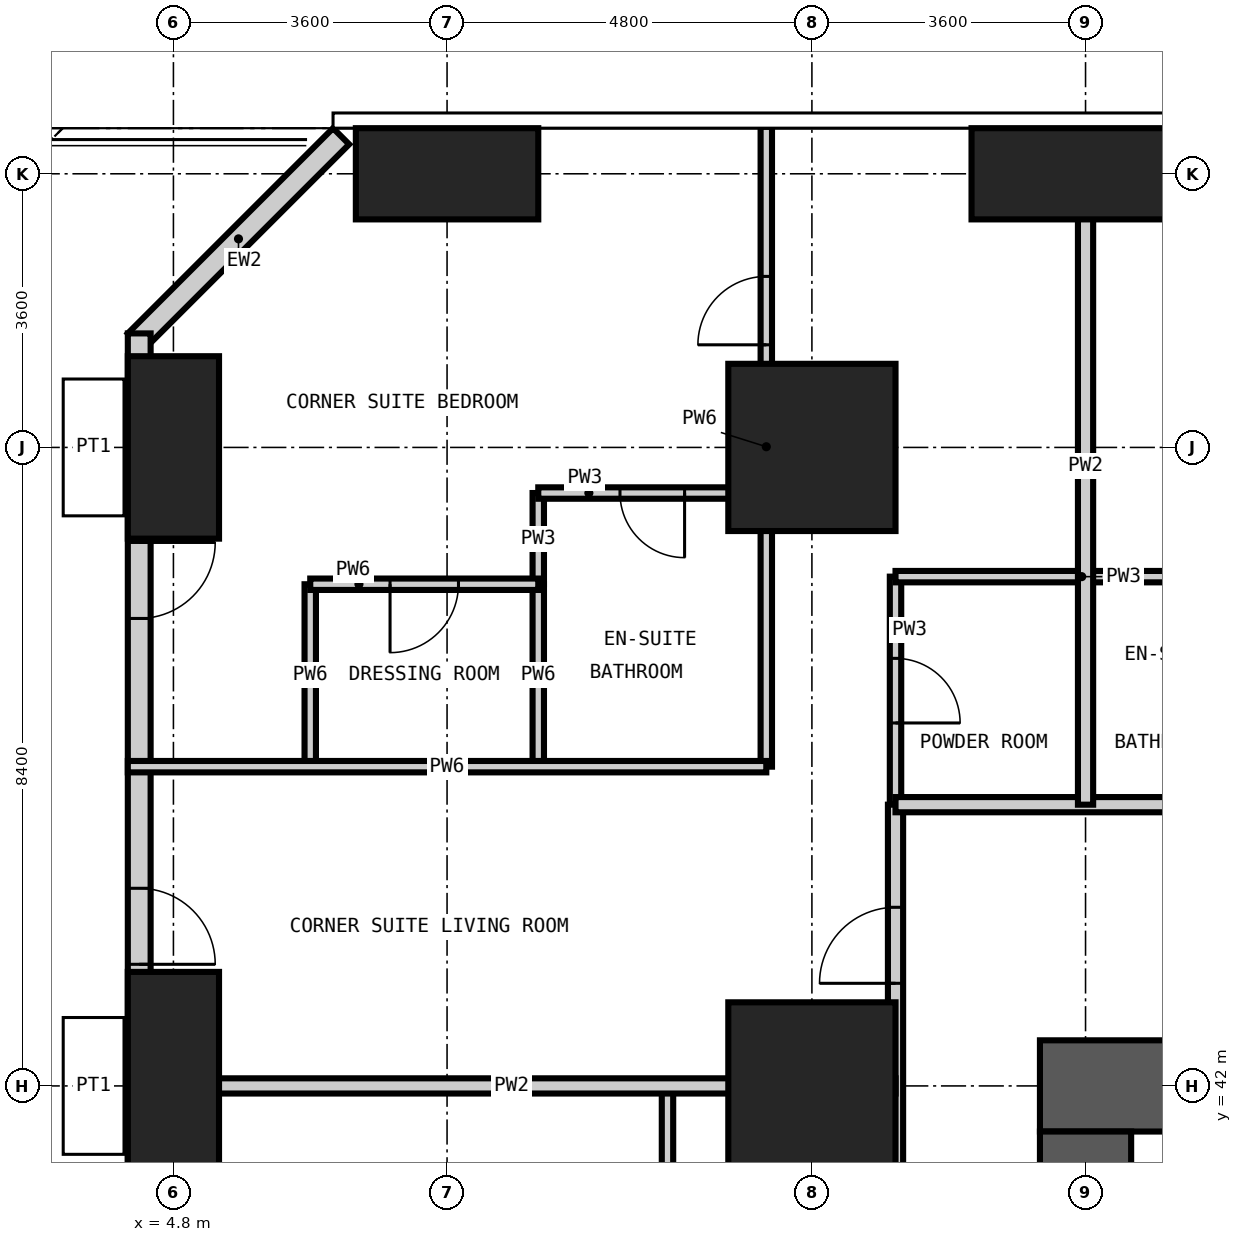
"""IFC4 building model, lengths in metres.
Left out: names, types, materials, properties, quantities, classifications, styles, units other than length and angle.
Written with IfcOpenShell. Run it as: python <this file> out.ifc"""

import sys

from ifc_helpers import new_model, si_unit, direction, frame, frame_2d, origin, origin_2d, place, context, subcontext, project, spatial, rectangle, extrude, element, fill, save


model = new_model("IFC4")
c1 = context("Model", 3, precision=1e-05, world=origin(), true_north=direction((0.0, 1.0)))
c2 = subcontext(c1, "Body", "Model", "MODEL_VIEW")
j1 = project(units=[si_unit("LENGTHUNIT", "METRE"), si_unit("PLANEANGLEUNIT", "RADIAN")], contexts=[c1])
p1 = place(None, origin())
s1 = spatial("IfcSite", under=j1, at=p1, CompositionType="ELEMENT")
p2 = place(p1, origin())
s2 = spatial("IfcBuilding", under=s1, at=p2, CompositionType="ELEMENT")
p3 = place(p2, frame((0.0, 0.0, 159.0)))
s3 = spatial("IfcBuildingStorey", under=s2, at=p3, CompositionType="ELEMENT", Elevation=159.0)
p4 = place(p3, frame((4.8, 42.0, -0.35), z_axis=(0.0, 0.0, 1.0), x_axis=(1.0, 0.0, 0.0)))
e1 = element("IfcColumn", 1, at=p4, inside=s3, PredefinedType="COLUMN", context=c2, shape_type="SweptSolid", body=[
    extrude(rectangle(XDim=1.2, YDim=3.0, at=origin_2d()), origin(), (0.0, 0.0, 1.0), 3.6),
])
p5 = place(p3, frame((4.8, 50.4, -0.35), z_axis=(0.0, 0.0, 1.0), x_axis=(1.0, 0.0, 0.0)))
e2 = element("IfcColumn", 2, at=p5, inside=s3, PredefinedType="COLUMN", context=c2, shape_type="SweptSolid", body=[
    extrude(rectangle(XDim=1.2, YDim=2.4, at=origin_2d()), origin(), (0.0, 0.0, 1.0), 3.6),
])
p6 = place(p3, frame((8.4, 54.0, -0.35), z_axis=(0.0, 0.0, 1.0), x_axis=(1.0, 0.0, 0.0)))
e3 = element("IfcColumn", 3, at=p6, inside=s3, PredefinedType="COLUMN", context=c2, shape_type="SweptSolid", body=[
    extrude(rectangle(XDim=2.4, YDim=1.2, at=origin_2d()), origin(), (0.0, 0.0, 1.0), 3.6),
])
for number, where, z_axis, x_axis in (
    (4, (13.2, 42.0, -0.35), (0.0, 0.0, 1.0), (1.0, 0.0, 0.0)),
    (5, (13.2, 50.4, -0.35), (0.0, 0.0, 1.0), (1.0, 0.0, 0.0)),
):
    element("IfcColumn", number, at=place(p3, frame(where, z_axis=z_axis, x_axis=x_axis)), inside=s3, PredefinedType="COLUMN", context=c2, shape_type="SweptSolid", body=[
        extrude(rectangle(XDim=2.2, YDim=2.2, at=origin_2d()), origin(), (0.0, 0.0, 1.0), 3.6),
    ])
p7 = place(p3, frame((16.8, 54.0, -0.35), z_axis=(0.0, 0.0, 1.0), x_axis=(1.0, 0.0, 0.0)))
e6 = element("IfcColumn", 6, at=p7, inside=s3, PredefinedType="COLUMN", context=c2, shape_type="SweptSolid", body=[
    extrude(rectangle(XDim=3.0, YDim=1.2, at=origin_2d()), origin(), (0.0, 0.0, 1.0), 3.6),
])
p8 = place(p3, frame((42.6, 42.0, -0.35), z_axis=(0.0, 0.0, 1.0), x_axis=(-1.0, 0.0, 0.0)))
e7 = element("IfcWall", 7, at=p8, inside=s3, PredefinedType="SHEAR", context=c2, shape_type="SweptSolid", body=[
    extrude(rectangle(XDim=26.4, YDim=1.2, at=frame_2d((13.2, 0.0))), origin(), (0.0, 0.0, 1.0), 3.6),
])
p9 = place(p8, frame((21.1, 0.0, 0.35)))
e8 = element("IfcOpeningElement", 8, at=p9, cuts=e7, PredefinedType="OPENING", context=c2, shape_type="SweptSolid", body=[
    extrude(rectangle(XDim=1.0, YDim=2.1, at=frame_2d((0.5, 1.05))), frame((0.0, 0.61, 0.0), z_axis=(0.0, -1.0, 0.0), x_axis=(1.0, 0.0, 0.0)), (0.0, 0.0, 1.0), 1.22),
])
p10 = place(p8, frame((10.5, 0.0, 0.35)))
e9 = element("IfcOpeningElement", 9, at=p10, cuts=e7, PredefinedType="OPENING", context=c2, shape_type="SweptSolid", body=[
    extrude(rectangle(XDim=1.2, YDim=2.2, at=frame_2d((0.6, 1.1))), frame((0.0, 0.61, 0.0), z_axis=(0.0, -1.0, 0.0), x_axis=(1.0, 0.0, 0.0)), (0.0, 0.0, 1.0), 1.22),
])
p11 = place(p3, frame((16.8, 41.4, -0.35), z_axis=(0.0, 0.0, 1.0), x_axis=(0.0, -1.0, 0.0)))
e10 = element("IfcWall", 10, at=p11, inside=s3, PredefinedType="SHEAR", context=c2, shape_type="SweptSolid", body=[
    extrude(rectangle(XDim=24.0, YDim=1.2, at=frame_2d((12.0, 0.0))), origin(), (0.0, 0.0, 1.0), 3.6),
])
p12 = place(p11, frame((11.1, 0.0, 0.35)))
e11 = element("IfcOpeningElement", 11, at=p12, cuts=e10, PredefinedType="OPENING", context=c2, shape_type="SweptSolid", body=[
    extrude(rectangle(XDim=1.8, YDim=2.2, at=frame_2d((0.9, 1.1))), frame((0.0, 0.61, 0.0), z_axis=(0.0, -1.0, 0.0), x_axis=(1.0, 0.0, 0.0)), (0.0, 0.0, 1.0), 1.22),
])
p13 = place(p11, frame((19.9, 0.0, 0.35)))
e12 = element("IfcOpeningElement", 12, at=p13, cuts=e10, PredefinedType="OPENING", context=c2, shape_type="SweptSolid", body=[
    extrude(rectangle(XDim=1.0, YDim=2.1, at=frame_2d((0.5, 1.05))), frame((0.0, 0.61, 0.0), z_axis=(0.0, -1.0, 0.0), x_axis=(1.0, 0.0, 0.0)), (0.0, 0.0, 1.0), 1.22),
])
p14 = place(p11, frame((5.2, 0.0, 0.35)))
e13 = element("IfcOpeningElement", 13, at=p14, cuts=e10, PredefinedType="OPENING", context=c2, shape_type="SweptSolid", body=[
    extrude(rectangle(XDim=1.0, YDim=2.1, at=frame_2d((0.5, 1.05))), frame((0.0, 0.61, 0.0), z_axis=(0.0, -1.0, 0.0), x_axis=(1.0, 0.0, 0.0)), (0.0, 0.0, 1.0), 1.22),
])
p15 = place(p3, frame((7.006, 54.494, 0.0), z_axis=(0.0, 0.0, 1.0), x_axis=(-0.707138748762, -0.707074812166, 0.0)))
e14 = element("IfcWall", 14, at=p15, inside=s3, PredefinedType="SOLIDWALL", context=c2, shape_type="SweptSolid", body=[
    extrude(rectangle(XDim=3.818, YDim=0.3, at=frame_2d((1.909, 0.0))), origin(), (0.0, 0.0, 1.0), 3.25),
])
p16 = place(p3, frame((4.35, 51.9, 0.0), z_axis=(0.0, 0.0, 1.0), x_axis=(0.0, -1.0, 0.0)))
e15 = element("IfcWall", 15, at=p16, inside=s3, PredefinedType="SOLIDWALL", context=c2, shape_type="SweptSolid", body=[
    extrude(rectangle(XDim=45.0, YDim=0.3, at=frame_2d((22.5, 0.0))), origin(), (0.0, 0.0, 1.0), 3.25),
])
p17 = place(p16, frame((41.25, 0.0, 0.0)))
e16 = element("IfcOpeningElement", 16, at=p17, cuts=e15, PredefinedType="OPENING", context=c2, shape_type="SweptSolid", body=[
    extrude(rectangle(XDim=1.0, YDim=2.4, at=frame_2d((0.5, 1.2))), frame((0.0, 0.16, 0.0), z_axis=(0.0, -1.0, 0.0), x_axis=(1.0, 0.0, 0.0)), (0.0, 0.0, 1.0), 0.32),
])
p18 = place(p16, frame((36.7, 0.0, 0.0)))
e17 = element("IfcOpeningElement", 17, at=p18, cuts=e15, PredefinedType="OPENING", context=c2, shape_type="SweptSolid", body=[
    extrude(rectangle(XDim=1.0, YDim=2.4, at=frame_2d((0.5, 1.2))), frame((0.0, 0.16, 0.0), z_axis=(0.0, -1.0, 0.0), x_axis=(1.0, 0.0, 0.0)), (0.0, 0.0, 1.0), 0.32),
])
p19 = place(p16, frame((32.5, 0.0, 0.0)))
e18 = element("IfcOpeningElement", 18, at=p19, cuts=e15, PredefinedType="OPENING", context=c2, shape_type="SweptSolid", body=[
    extrude(rectangle(XDim=1.0, YDim=2.4, at=frame_2d((0.5, 1.2))), frame((0.0, 0.16, 0.0), z_axis=(0.0, -1.0, 0.0), x_axis=(1.0, 0.0, 0.0)), (0.0, 0.0, 1.0), 0.32),
])
p20 = place(p16, frame((28.3, 0.0, 0.0)))
e19 = element("IfcOpeningElement", 19, at=p20, cuts=e15, PredefinedType="OPENING", context=c2, shape_type="SweptSolid", body=[
    extrude(rectangle(XDim=1.0, YDim=2.4, at=frame_2d((0.5, 1.2))), frame((0.0, 0.16, 0.0), z_axis=(0.0, -1.0, 0.0), x_axis=(1.0, 0.0, 0.0)), (0.0, 0.0, 1.0), 0.32),
])
p21 = place(p16, frame((24.1, 0.0, 0.0)))
e20 = element("IfcOpeningElement", 20, at=p21, cuts=e15, PredefinedType="OPENING", context=c2, shape_type="SweptSolid", body=[
    extrude(rectangle(XDim=1.0, YDim=2.4, at=frame_2d((0.5, 1.2))), frame((0.0, 0.16, 0.0), z_axis=(0.0, -1.0, 0.0), x_axis=(1.0, 0.0, 0.0)), (0.0, 0.0, 1.0), 0.32),
])
p22 = place(p16, frame((19.9, 0.0, 0.0)))
e21 = element("IfcOpeningElement", 21, at=p22, cuts=e15, PredefinedType="OPENING", context=c2, shape_type="SweptSolid", body=[
    extrude(rectangle(XDim=1.0, YDim=2.4, at=frame_2d((0.5, 1.2))), frame((0.0, 0.16, 0.0), z_axis=(0.0, -1.0, 0.0), x_axis=(1.0, 0.0, 0.0)), (0.0, 0.0, 1.0), 0.32),
])
p23 = place(p16, frame((15.7, 0.0, 0.0)))
e22 = element("IfcOpeningElement", 22, at=p23, cuts=e15, PredefinedType="OPENING", context=c2, shape_type="SweptSolid", body=[
    extrude(rectangle(XDim=1.0, YDim=2.4, at=frame_2d((0.5, 1.2))), frame((0.0, 0.16, 0.0), z_axis=(0.0, -1.0, 0.0), x_axis=(1.0, 0.0, 0.0)), (0.0, 0.0, 1.0), 0.32),
])
p24 = place(p16, frame((11.5, 0.0, 0.0)))
e23 = element("IfcOpeningElement", 23, at=p24, cuts=e15, PredefinedType="OPENING", context=c2, shape_type="SweptSolid", body=[
    extrude(rectangle(XDim=1.0, YDim=2.4, at=frame_2d((0.5, 1.2))), frame((0.0, 0.16, 0.0), z_axis=(0.0, -1.0, 0.0), x_axis=(1.0, 0.0, 0.0)), (0.0, 0.0, 1.0), 0.32),
])
p25 = place(p16, frame((7.3, 0.0, 0.0)))
e24 = element("IfcOpeningElement", 24, at=p25, cuts=e15, PredefinedType="OPENING", context=c2, shape_type="SweptSolid", body=[
    extrude(rectangle(XDim=1.0, YDim=2.4, at=frame_2d((0.5, 1.2))), frame((0.0, 0.16, 0.0), z_axis=(0.0, -1.0, 0.0), x_axis=(1.0, 0.0, 0.0)), (0.0, 0.0, 1.0), 0.32),
])
p26 = place(p16, frame((2.75, 0.0, 0.0)))
e25 = element("IfcOpeningElement", 25, at=p26, cuts=e15, PredefinedType="OPENING", context=c2, shape_type="SweptSolid", body=[
    extrude(rectangle(XDim=1.0, YDim=2.4, at=frame_2d((0.5, 1.2))), frame((0.0, 0.16, 0.0), z_axis=(0.0, -1.0, 0.0), x_axis=(1.0, 0.0, 0.0)), (0.0, 0.0, 1.0), 0.32),
])
p27 = place(p3, frame((9.6, 48.6, 0.0), z_axis=(0.0, 0.0, 1.0), x_axis=(0.0, 1.0, 0.0)))
e26 = element("IfcWall", 26, at=p27, inside=s3, PredefinedType="PARTITIONING", context=c2, shape_type="SweptSolid", body=[
    extrude(rectangle(XDim=1.2, YDim=0.15, at=frame_2d((0.6, 0.0))), origin(), (0.0, 0.0, 1.0), 3.25),
])
p28 = place(p3, frame((11.3, 39.6, 0.0), z_axis=(0.0, 0.0, 1.0), x_axis=(0.0, 1.0, 0.0)))
e27 = element("IfcWall", 27, at=p28, inside=s3, PredefinedType="PARTITIONING", context=c2, shape_type="SweptSolid", body=[
    extrude(rectangle(XDim=2.4, YDim=0.15, at=frame_2d((1.2, 0.0))), origin(), (0.0, 0.0, 1.0), 3.25),
])
p29 = place(p3, frame((14.3, 45.7, 0.0), z_axis=(0.0, 0.0, 1.0), x_axis=(0.0, 1.0, 0.0)))
e28 = element("IfcWall", 28, at=p29, inside=s3, PredefinedType="PARTITIONING", context=c2, shape_type="SweptSolid", body=[
    extrude(rectangle(XDim=3.0, YDim=0.15, at=frame_2d((1.5, 0.0))), origin(), (0.0, 0.0, 1.0), 3.25),
])
p30 = place(p29, frame((1.075, 0.0, 0.0)))
e29 = element("IfcOpeningElement", 29, at=p30, cuts=e28, PredefinedType="OPENING", context=c2, shape_type="SweptSolid", body=[
    extrude(rectangle(XDim=0.85, YDim=2.1, at=frame_2d((0.425, 1.05))), frame((0.0, 0.085, 0.0), z_axis=(0.0, -1.0, 0.0), x_axis=(1.0, 0.0, 0.0)), (0.0, 0.0, 1.0), 0.17),
])
p31 = place(p3, frame((14.3, 48.7, 0.0), z_axis=(0.0, 0.0, 1.0), x_axis=(1.0, 0.0, 0.0)))
e30 = element("IfcWall", 30, at=p31, inside=s3, PredefinedType="PARTITIONING", context=c2, shape_type="SweptSolid", body=[
    extrude(rectangle(XDim=4.9, YDim=0.15, at=frame_2d((2.45, 0.0))), origin(), (0.0, 0.0, 1.0), 3.25),
])
p32 = place(p3, frame((9.6, 49.8, 0.0), z_axis=(0.0, 0.0, 1.0), x_axis=(1.0, 0.0, 0.0)))
e31 = element("IfcWall", 31, at=p32, inside=s3, PredefinedType="PARTITIONING", context=c2, shape_type="SweptSolid", body=[
    extrude(rectangle(XDim=3.0, YDim=0.15, at=frame_2d((1.5, 0.0))), origin(), (0.0, 0.0, 1.0), 3.25),
])
p33 = place(p32, frame((1.075, 0.0, 0.0)))
e32 = element("IfcOpeningElement", 32, at=p33, cuts=e31, PredefinedType="OPENING", context=c2, shape_type="SweptSolid", body=[
    extrude(rectangle(XDim=0.85, YDim=2.1, at=frame_2d((0.425, 1.05))), frame((0.0, 0.085, 0.0), z_axis=(0.0, -1.0, 0.0), x_axis=(1.0, 0.0, 0.0)), (0.0, 0.0, 1.0), 0.17),
])
p34 = place(p3, frame((14.3, 14.3, 0.0), z_axis=(0.0, 0.0, 1.0), x_axis=(0.0, 1.0, 0.0)))
e33 = element("IfcWall", 33, at=p34, inside=s3, PredefinedType="PARTITIONING", context=c2, shape_type="SweptSolid", body=[
    extrude(rectangle(XDim=31.4, YDim=0.2, at=frame_2d((15.7, 0.0))), origin(), (0.0, 0.0, 1.0), 3.25),
])
p35 = place(p34, frame((8.3, 0.0, 0.0)))
e34 = element("IfcOpeningElement", 34, at=p35, cuts=e33, PredefinedType="OPENING", context=c2, shape_type="SweptSolid", body=[
    extrude(rectangle(XDim=1.0, YDim=2.2, at=frame_2d((0.5, 1.1))), frame((0.0, 0.11, 0.0), z_axis=(0.0, -1.0, 0.0), x_axis=(1.0, 0.0, 0.0)), (0.0, 0.0, 1.0), 0.22),
])
p36 = place(p34, frame((20.9, 0.0, 0.0)))
e35 = element("IfcOpeningElement", 35, at=p36, cuts=e33, PredefinedType="OPENING", context=c2, shape_type="SweptSolid", body=[
    extrude(rectangle(XDim=1.0, YDim=2.2, at=frame_2d((0.5, 1.1))), frame((0.0, 0.11, 0.0), z_axis=(0.0, -1.0, 0.0), x_axis=(1.0, 0.0, 0.0)), (0.0, 0.0, 1.0), 0.22),
])
p37 = place(p34, frame((0.35, 0.0, 0.0)))
e36 = element("IfcOpeningElement", 36, at=p37, cuts=e33, PredefinedType="OPENING", context=c2, shape_type="SweptSolid", body=[
    extrude(rectangle(XDim=1.0, YDim=2.2, at=frame_2d((0.5, 1.1))), frame((0.0, 0.11, 0.0), z_axis=(0.0, -1.0, 0.0), x_axis=(1.0, 0.0, 0.0)), (0.0, 0.0, 1.0), 0.22),
])
p38 = place(p34, frame((29.05, 0.0, 0.0)))
e37 = element("IfcOpeningElement", 37, at=p38, cuts=e33, PredefinedType="OPENING", context=c2, shape_type="SweptSolid", body=[
    extrude(rectangle(XDim=1.0, YDim=2.2, at=frame_2d((0.5, 1.1))), frame((0.0, 0.11, 0.0), z_axis=(0.0, -1.0, 0.0), x_axis=(1.0, 0.0, 0.0)), (0.0, 0.0, 1.0), 0.22),
])
p39 = place(p3, frame((14.3, 45.7, 0.0), z_axis=(0.0, 0.0, 1.0), x_axis=(1.0, 0.0, 0.0)))
e38 = element("IfcWall", 38, at=p39, inside=s3, PredefinedType="PARTITIONING", context=c2, shape_type="SweptSolid", body=[
    extrude(rectangle(XDim=10.9, YDim=0.2, at=frame_2d((5.45, 0.0))), origin(), (0.0, 0.0, 1.0), 3.25),
])
p40 = place(p39, frame((5.3, 0.0, 0.0)))
e39 = element("IfcOpeningElement", 39, at=p40, cuts=e38, PredefinedType="OPENING", context=c2, shape_type="SweptSolid", body=[
    extrude(rectangle(XDim=1.0, YDim=2.2, at=frame_2d((0.5, 1.1))), frame((0.0, 0.11, 0.0), z_axis=(0.0, -1.0, 0.0), x_axis=(1.0, 0.0, 0.0)), (0.0, 0.0, 1.0), 0.22),
])
p41 = place(p39, frame((7.1, 0.0, 0.0)))
e40 = element("IfcOpeningElement", 40, at=p41, cuts=e38, PredefinedType="OPENING", context=c2, shape_type="SweptSolid", body=[
    extrude(rectangle(XDim=1.0, YDim=2.2, at=frame_2d((0.5, 1.1))), frame((0.0, 0.11, 0.0), z_axis=(0.0, -1.0, 0.0), x_axis=(1.0, 0.0, 0.0)), (0.0, 0.0, 1.0), 0.22),
])
p42 = place(p3, frame((16.8, 45.7, 0.0), z_axis=(0.0, 0.0, 1.0), x_axis=(0.0, 1.0, 0.0)))
e41 = element("IfcWall", 41, at=p42, inside=s3, PredefinedType="PARTITIONING", context=c2, shape_type="SweptSolid", body=[
    extrude(rectangle(XDim=8.918, YDim=0.2, at=frame_2d((4.459, 0.0))), origin(), (0.0, 0.0, 1.0), 3.25),
])
p43 = place(p3, frame((4.2, 42.0, 0.0), z_axis=(0.0, 0.0, 1.0), x_axis=(1.0, 0.0, 0.0)))
e42 = element("IfcWall", 42, at=p43, inside=s3, PredefinedType="PARTITIONING", context=c2, shape_type="SweptSolid", body=[
    extrude(rectangle(XDim=10.1, YDim=0.2, at=frame_2d((5.05, 0.0))), origin(), (0.0, 0.0, 1.0), 3.25),
])
for number, where, z_axis, x_axis in (
    (43, (6.6, 46.2, 0.0), (0.0, 0.0, 1.0), (0.0, 1.0, 0.0)),
    (44, (9.6, 46.2, 0.0), (0.0, 0.0, 1.0), (0.0, 1.0, 0.0)),
):
    element("IfcWall", number, at=place(p3, frame(where, z_axis=z_axis, x_axis=x_axis)), inside=s3, PredefinedType="PARTITIONING", context=c2, shape_type="SweptSolid", body=[
        extrude(rectangle(XDim=2.4, YDim=0.15, at=frame_2d((1.2, 0.0))), origin(), (0.0, 0.0, 1.0), 3.25),
    ])
p44 = place(p3, frame((12.6, 46.2, 0.0), z_axis=(0.0, 0.0, 1.0), x_axis=(0.0, 1.0, 0.0)))
e45 = element("IfcWall", 45, at=p44, inside=s3, PredefinedType="PARTITIONING", context=c2, shape_type="SweptSolid", body=[
    extrude(rectangle(XDim=8.418, YDim=0.15, at=frame_2d((4.209, 0.0))), origin(), (0.0, 0.0, 1.0), 3.25),
])
p45 = place(p44, frame((5.55, 0.0, 0.0)))
e46 = element("IfcOpeningElement", 46, at=p45, cuts=e45, PredefinedType="OPENING", context=c2, shape_type="SweptSolid", body=[
    extrude(rectangle(XDim=0.9, YDim=2.1, at=frame_2d((0.45, 1.05))), frame((0.0, 0.085, 0.0), z_axis=(0.0, -1.0, 0.0), x_axis=(1.0, 0.0, 0.0)), (0.0, 0.0, 1.0), 0.17),
])
p46 = place(p3, frame((4.2, 46.2, 0.0), z_axis=(0.0, 0.0, 1.0), x_axis=(1.0, 0.0, 0.0)))
e47 = element("IfcWall", 47, at=p46, inside=s3, PredefinedType="PARTITIONING", context=c2, shape_type="SweptSolid", body=[
    extrude(rectangle(XDim=8.4, YDim=0.15, at=frame_2d((4.2, 0.0))), origin(), (0.0, 0.0, 1.0), 3.25),
])
p47 = place(p3, frame((6.6, 48.6, 0.0), z_axis=(0.0, 0.0, 1.0), x_axis=(1.0, 0.0, 0.0)))
e48 = element("IfcWall", 48, at=p47, inside=s3, PredefinedType="PARTITIONING", context=c2, shape_type="SweptSolid", body=[
    extrude(rectangle(XDim=3.0, YDim=0.15, at=frame_2d((1.5, 0.0))), origin(), (0.0, 0.0, 1.0), 3.25),
])
p48 = place(p47, frame((1.05, 0.0, 0.0)))
e49 = element("IfcOpeningElement", 49, at=p48, cuts=e48, PredefinedType="OPENING", context=c2, shape_type="SweptSolid", body=[
    extrude(rectangle(XDim=0.9, YDim=2.1, at=frame_2d((0.45, 1.05))), frame((0.0, 0.085, 0.0), z_axis=(0.0, -1.0, 0.0), x_axis=(1.0, 0.0, 0.0)), (0.0, 0.0, 1.0), 0.17),
])
p49 = place(p25, origin())
e50 = element("IfcDoor", 50, at=p49, inside=s3, OperationType="SINGLE_SWING_RIGHT", PredefinedType="DOOR", context=c2, shape_type="SweptSolid", body=[
    extrude(rectangle(XDim=1.0, YDim=2.4, at=frame_2d((0.5, 1.2))), frame((0.0, 0.025, 0.0), z_axis=(0.0, -1.0, 0.0), x_axis=(1.0, 0.0, 0.0)), (0.0, 0.0, 1.0), 0.05),
])
fill(e24, e50)
p50 = place(p26, origin())
e51 = element("IfcDoor", 51, at=p50, inside=s3, OperationType="SINGLE_SWING_LEFT", PredefinedType="DOOR", context=c2, shape_type="SweptSolid", body=[
    extrude(rectangle(XDim=1.0, YDim=2.4, at=frame_2d((0.5, 1.2))), frame((0.0, 0.025, 0.0), z_axis=(0.0, -1.0, 0.0), x_axis=(1.0, 0.0, 0.0)), (0.0, 0.0, 1.0), 0.05),
])
fill(e25, e51)
p51 = place(p38, origin())
e52 = element("IfcDoor", 52, at=p51, inside=s3, OperationType="SINGLE_SWING_LEFT", PredefinedType="DOOR", context=c2, shape_type="SweptSolid", body=[
    extrude(rectangle(XDim=1.0, YDim=2.2, at=frame_2d((0.5, 1.1))), frame((0.0, 0.025, 0.0), z_axis=(0.0, -1.0, 0.0), x_axis=(1.0, 0.0, 0.0)), (0.0, 0.0, 1.0), 0.05),
])
fill(e37, e52)
p52 = place(p30, frame((0.85, 0.0, 0.0), z_axis=(0.0, 0.0, 1.0), x_axis=(-1.0, 0.0, 0.0)))
e53 = element("IfcDoor", 53, at=p52, inside=s3, OperationType="SINGLE_SWING_RIGHT", PredefinedType="DOOR", context=c2, shape_type="SweptSolid", body=[
    extrude(rectangle(XDim=0.85, YDim=2.1, at=frame_2d((0.425, 1.05))), frame((0.0, 0.025, 0.0), z_axis=(0.0, -1.0, 0.0), x_axis=(1.0, 0.0, 0.0)), (0.0, 0.0, 1.0), 0.05),
])
fill(e29, e53)
p53 = place(p45, origin())
e54 = element("IfcDoor", 54, at=p53, inside=s3, OperationType="SINGLE_SWING_LEFT", PredefinedType="DOOR", context=c2, shape_type="SweptSolid", body=[
    extrude(rectangle(XDim=0.9, YDim=2.1, at=frame_2d((0.45, 1.05))), frame((0.0, 0.025, 0.0), z_axis=(0.0, -1.0, 0.0), x_axis=(1.0, 0.0, 0.0)), (0.0, 0.0, 1.0), 0.05),
])
fill(e46, e54)
p54 = place(p33, frame((0.85, 0.0, 0.0), z_axis=(0.0, 0.0, 1.0), x_axis=(-1.0, 0.0, 0.0)))
e55 = element("IfcDoor", 55, at=p54, inside=s3, OperationType="SINGLE_SWING_LEFT", PredefinedType="DOOR", context=c2, shape_type="SweptSolid", body=[
    extrude(rectangle(XDim=0.85, YDim=2.1, at=frame_2d((0.425, 1.05))), frame((0.0, 0.025, 0.0), z_axis=(0.0, -1.0, 0.0), x_axis=(1.0, 0.0, 0.0)), (0.0, 0.0, 1.0), 0.05),
])
fill(e32, e55)
p55 = place(p48, frame((0.9, 0.0, 0.0), z_axis=(0.0, 0.0, 1.0), x_axis=(-1.0, 0.0, 0.0)))
e56 = element("IfcDoor", 56, at=p55, inside=s3, OperationType="SINGLE_SWING_RIGHT", PredefinedType="DOOR", context=c2, shape_type="SweptSolid", body=[
    extrude(rectangle(XDim=0.9, YDim=2.1, at=frame_2d((0.45, 1.05))), frame((0.0, 0.025, 0.0), z_axis=(0.0, -1.0, 0.0), x_axis=(1.0, 0.0, 0.0)), (0.0, 0.0, 1.0), 0.05),
])
fill(e49, e56)
save(model, sys.argv[1])
